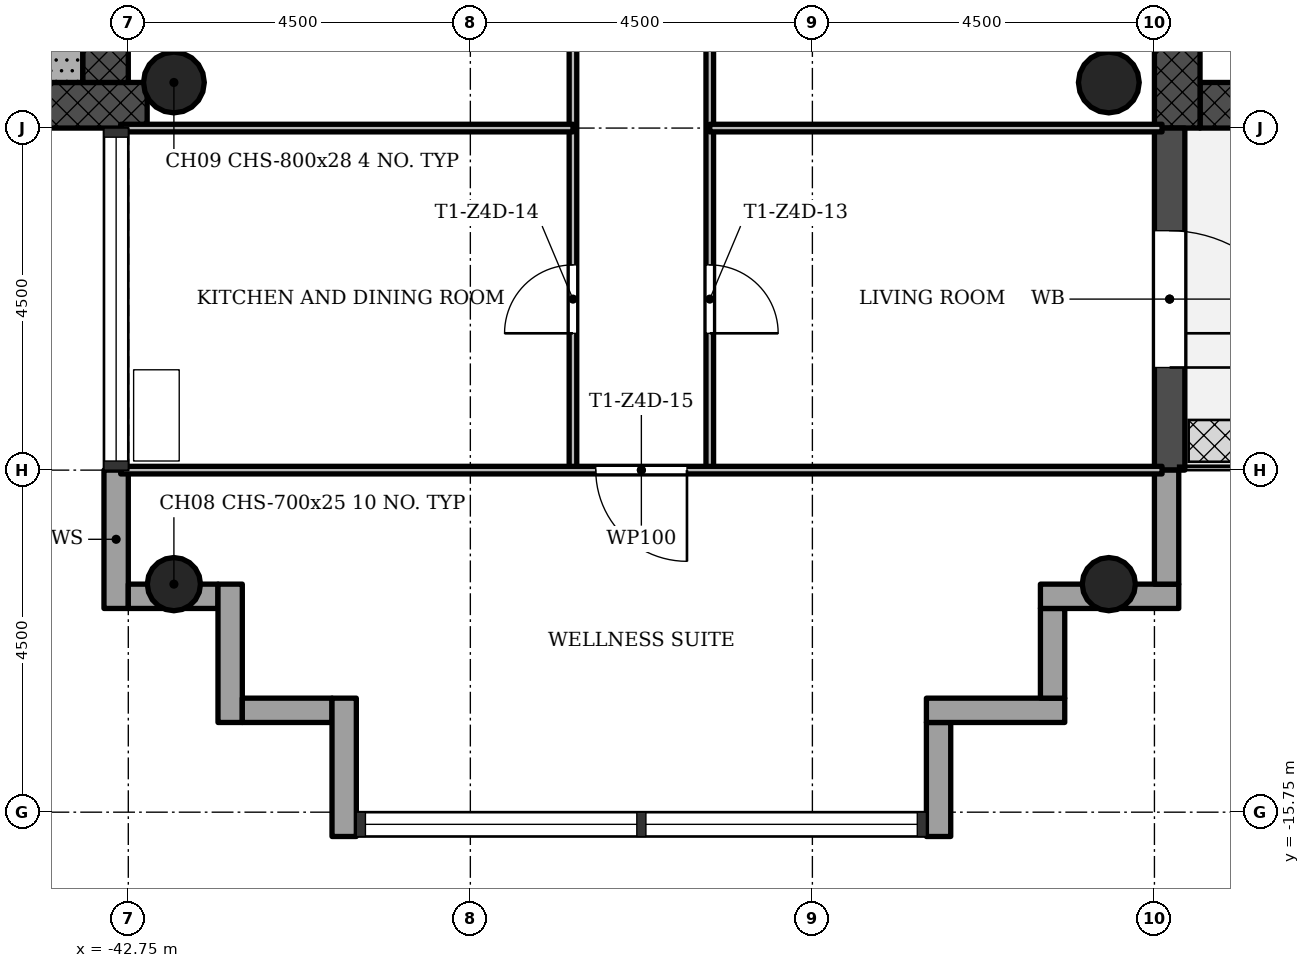
"""IFC4 building model, lengths in metres.
Left out: names, types, materials, properties, quantities, classifications, styles, units other than length and angle.
Written with IfcOpenShell. Run it as: python <this file> out.ifc"""

import sys

from ifc_helpers import new_model, si_unit, direction, frame, frame_2d, origin, origin_2d, place, context, subcontext, project, spatial, rectangle, hollow_circle, extrude, element, fill, save


model = new_model("IFC4")
c1 = context("Model", 3, precision=1e-05, world=origin(), true_north=direction((0.0, 1.0)))
c2 = subcontext(c1, "Body", "Model", "MODEL_VIEW")
j1 = project(units=[si_unit("LENGTHUNIT", "METRE"), si_unit("PLANEANGLEUNIT", "RADIAN")], contexts=[c1])
p1 = place(None, origin())
s1 = spatial("IfcSite", under=j1, at=p1, CompositionType="ELEMENT")
p2 = place(p1, origin())
s2 = spatial("IfcBuilding", under=s1, at=p2, CompositionType="ELEMENT")
p3 = place(p2, frame((0.0, 0.0, 199.4)))
s3 = spatial("IfcBuildingStorey", under=s2, at=p3, CompositionType="ELEMENT", Elevation=199.4)
p4 = place(p3, frame((-28.65, -6.45, 0.0), z_axis=(0.0, 0.0, 1.0), x_axis=(1.0, 0.0, 0.0)))
e1 = element("IfcWall", 1, at=p4, inside=s3, PredefinedType="SHEAR", context=c2, shape_type="SweptSolid", body=[
    extrude(rectangle(XDim=8.4, YDim=0.6, at=frame_2d((4.2, 0.0))), origin(), (0.0, 0.0, 1.0), 3.4),
])
p5 = place(p3, frame((-28.95, 6.15, 0.0), z_axis=(0.0, 0.0, 1.0), x_axis=(0.0, -1.0, 0.0)))
e2 = element("IfcWall", 2, at=p5, inside=s3, PredefinedType="SHEAR", context=c2, shape_type="SweptSolid", body=[
    extrude(rectangle(XDim=12.9, YDim=0.6, at=frame_2d((6.45, 0.0))), origin(), (0.0, 0.0, 1.0), 3.4),
])
p6 = place(p5, frame((5.25, 0.0, 0.0)))
e3 = element("IfcOpeningElement", 3, at=p6, cuts=e2, PredefinedType="OPENING", context=c2, shape_type="SweptSolid", body=[
    extrude(rectangle(XDim=1.8, YDim=2.1, at=frame_2d((0.9, 1.05))), frame((0.0, 0.31, 0.0), z_axis=(0.0, -1.0, 0.0), x_axis=(1.0, 0.0, 0.0)), (0.0, 0.0, 1.0), 0.62),
])
p7 = place(p3, frame((-51.15, -6.45, 0.0), z_axis=(0.0, 0.0, 1.0), x_axis=(1.0, 0.0, 0.0)))
e4 = element("IfcWall", 4, at=p7, inside=s3, PredefinedType="SHEAR", context=c2, shape_type="SweptSolid", body=[
    extrude(rectangle(XDim=8.648, YDim=0.6, at=frame_2d((4.324, 0.0))), origin(), (0.0, 0.0, 1.0), 3.4),
])
p8 = place(p3, frame((-43.05, -6.15, 0.0), z_axis=(0.0, 0.0, 1.0), x_axis=(0.0, 1.0, 0.0)))
e5 = element("IfcWall", 5, at=p8, inside=s3, PredefinedType="SHEAR", context=c2, shape_type="SweptSolid", body=[
    extrude(rectangle(XDim=12.9, YDim=0.6, at=frame_2d((6.45, 0.0))), origin(), (0.0, 0.0, 1.0), 3.4),
])
p9 = place(p8, frame((5.25, 0.0, 0.0)))
e6 = element("IfcOpeningElement", 6, at=p9, cuts=e5, PredefinedType="OPENING", context=c2, shape_type="SweptSolid", body=[
    extrude(rectangle(XDim=1.8, YDim=2.1, at=frame_2d((0.9, 1.05))), frame((0.0, 0.31, 0.0), z_axis=(0.0, -1.0, 0.0), x_axis=(1.0, 0.0, 0.0)), (0.0, 0.0, 1.0), 0.62),
])
for number, where, z_axis, x_axis in (
    (7, (-42.15, -12.75, 0.0), (0.0, 0.0, 1.0), (1.0, 0.0, 0.0)),
    (8, (-29.85, -12.75, 0.0), (0.0, 0.0, 1.0), (1.0, 0.0, 0.0)),
):
    element("IfcColumn", number, at=place(p3, frame(where, z_axis=z_axis, x_axis=x_axis)), inside=s3, PredefinedType="COLUMN", context=c2, shape_type="SweptSolid", body=[
        extrude(hollow_circle(Radius=0.35, WallThickness=0.025, at=origin_2d()), origin(), (0.0, 0.0, 1.0), 3.4),
    ])
for number, where, z_axis, x_axis in (
    (9, (-42.15, -6.15, 0.0), (0.0, 0.0, 1.0), (1.0, 0.0, 0.0)),
    (10, (-29.85, -6.15, 0.0), (0.0, 0.0, 1.0), (1.0, 0.0, 0.0)),
):
    element("IfcColumn", number, at=place(p3, frame(where, z_axis=z_axis, x_axis=x_axis)), inside=s3, PredefinedType="COLUMN", context=c2, shape_type="SweptSolid", body=[
        extrude(hollow_circle(Radius=0.4, WallThickness=0.028, at=origin_2d()), origin(), (0.0, 0.0, 1.0), 3.4),
    ])
p10 = place(p3, frame((-42.91, -11.25, -0.3), z_axis=(0.0, 0.0, 1.0), x_axis=(0.0, -1.0, 0.0)))
e11 = element("IfcWall", 11, at=p10, inside=s3, PredefinedType="STANDARD", context=c2, shape_type="SweptSolid", body=[
    extrude(rectangle(XDim=1.82, YDim=0.32, at=frame_2d((0.91, 0.0))), origin(), (0.0, 0.0, 1.0), 3.4),
])
p11 = place(p3, frame((-42.75, -12.91, -0.3), z_axis=(0.0, 0.0, 1.0), x_axis=(1.0, 0.0, 0.0)))
e12 = element("IfcWall", 12, at=p11, inside=s3, PredefinedType="STANDARD", context=c2, shape_type="SweptSolid", body=[
    extrude(rectangle(XDim=1.18, YDim=0.32, at=frame_2d((0.59, 0.0))), origin(), (0.0, 0.0, 1.0), 3.4),
])
p12 = place(p3, frame((-41.41, -12.75, -0.3), z_axis=(0.0, 0.0, 1.0), x_axis=(0.0, -1.0, 0.0)))
e13 = element("IfcWall", 13, at=p12, inside=s3, PredefinedType="STANDARD", context=c2, shape_type="SweptSolid", body=[
    extrude(rectangle(XDim=1.82, YDim=0.32, at=frame_2d((0.91, 0.0))), origin(), (0.0, 0.0, 1.0), 3.4),
])
p13 = place(p3, frame((-41.25, -14.41, -0.3), z_axis=(0.0, 0.0, 1.0), x_axis=(1.0, 0.0, 0.0)))
e14 = element("IfcWall", 14, at=p13, inside=s3, PredefinedType="STANDARD", context=c2, shape_type="SweptSolid", body=[
    extrude(rectangle(XDim=1.18, YDim=0.32, at=frame_2d((0.59, 0.0))), origin(), (0.0, 0.0, 1.0), 3.4),
])
p14 = place(p3, frame((-39.91, -14.25, -0.3), z_axis=(0.0, 0.0, 1.0), x_axis=(0.0, -1.0, 0.0)))
e15 = element("IfcWall", 15, at=p14, inside=s3, PredefinedType="STANDARD", context=c2, shape_type="SweptSolid", body=[
    extrude(rectangle(XDim=1.82, YDim=0.32, at=frame_2d((0.91, 0.0))), origin(), (0.0, 0.0, 1.0), 3.4),
])
p15 = place(p3, frame((-32.09, -16.07, -0.3), z_axis=(0.0, 0.0, 1.0), x_axis=(0.0, 1.0, 0.0)))
e16 = element("IfcWall", 16, at=p15, inside=s3, PredefinedType="STANDARD", context=c2, shape_type="SweptSolid", body=[
    extrude(rectangle(XDim=1.5, YDim=0.32, at=frame_2d((0.75, 0.0))), origin(), (0.0, 0.0, 1.0), 3.4),
])
p16 = place(p3, frame((-32.25, -14.41, -0.3), z_axis=(0.0, 0.0, 1.0), x_axis=(1.0, 0.0, 0.0)))
e17 = element("IfcWall", 17, at=p16, inside=s3, PredefinedType="STANDARD", context=c2, shape_type="SweptSolid", body=[
    extrude(rectangle(XDim=1.82, YDim=0.32, at=frame_2d((0.91, 0.0))), origin(), (0.0, 0.0, 1.0), 3.4),
])
p17 = place(p3, frame((-30.59, -14.25, -0.3), z_axis=(0.0, 0.0, 1.0), x_axis=(0.0, 1.0, 0.0)))
e18 = element("IfcWall", 18, at=p17, inside=s3, PredefinedType="STANDARD", context=c2, shape_type="SweptSolid", body=[
    extrude(rectangle(XDim=1.18, YDim=0.32, at=frame_2d((0.59, 0.0))), origin(), (0.0, 0.0, 1.0), 3.4),
])
p18 = place(p3, frame((-30.75, -12.91, -0.3), z_axis=(0.0, 0.0, 1.0), x_axis=(1.0, 0.0, 0.0)))
e19 = element("IfcWall", 19, at=p18, inside=s3, PredefinedType="STANDARD", context=c2, shape_type="SweptSolid", body=[
    extrude(rectangle(XDim=1.82, YDim=0.32, at=frame_2d((0.91, 0.0))), origin(), (0.0, 0.0, 1.0), 3.4),
])
p19 = place(p3, frame((-29.09, -12.75, -0.3), z_axis=(0.0, 0.0, 1.0), x_axis=(0.0, 1.0, 0.0)))
e20 = element("IfcWall", 20, at=p19, inside=s3, PredefinedType="STANDARD", context=c2, shape_type="SweptSolid", body=[
    extrude(rectangle(XDim=1.5, YDim=0.32, at=frame_2d((0.75, 0.0))), origin(), (0.0, 0.0, 1.0), 3.4),
])
p20 = place(p3, frame((-29.05, -11.25, -0.02), z_axis=(0.0, 0.0, 1.0), x_axis=(0.0, 1.0, 0.0)))
e21 = element("IfcWall", 21, at=p20, inside=s3, PredefinedType="STANDARD", context=c2, shape_type="SweptSolid", body=[
    extrude(rectangle(XDim=4.5, YDim=0.4, at=frame_2d((2.25, 0.0))), origin(), (0.0, 0.0, 1.0), 3.12),
])
p21 = place(p20, frame((1.35, 0.0, 0.02)))
e22 = element("IfcOpeningElement", 22, at=p21, cuts=e21, PredefinedType="OPENING", context=c2, shape_type="SweptSolid", body=[
    extrude(rectangle(XDim=1.8, YDim=2.1, at=frame_2d((0.9, 1.05))), frame((0.0, 0.21, 0.0), z_axis=(0.0, -1.0, 0.0), x_axis=(1.0, 0.0, 0.0)), (0.0, 0.0, 1.0), 0.42),
])
p22 = place(p3, frame((-36.9, -11.25, 0.0), z_axis=(0.0, 0.0, 1.0), x_axis=(0.0, 1.0, 0.0)))
e23 = element("IfcWall", 23, at=p22, inside=s3, PredefinedType="PARTITIONING", context=c2, shape_type="SweptSolid", body=[
    extrude(rectangle(XDim=6.75, YDim=0.1, at=frame_2d((3.375, 0.0))), origin(), (0.0, 0.0, 1.0), 3.0),
])
p23 = place(p22, frame((1.8, 0.0, 0.0)))
e24 = element("IfcOpeningElement", 24, at=p23, cuts=e23, PredefinedType="OPENING", context=c2, shape_type="SweptSolid", body=[
    extrude(rectangle(XDim=0.9, YDim=2.1, at=frame_2d((0.45, 1.05))), frame((0.0, 0.06, 0.0), z_axis=(0.0, -1.0, 0.0), x_axis=(1.0, 0.0, 0.0)), (0.0, 0.0, 1.0), 0.12),
])
p24 = place(p3, frame((-35.1, -11.25, 0.0), z_axis=(0.0, 0.0, 1.0), x_axis=(0.0, 1.0, 0.0)))
e25 = element("IfcWall", 25, at=p24, inside=s3, PredefinedType="PARTITIONING", context=c2, shape_type="SweptSolid", body=[
    extrude(rectangle(XDim=6.75, YDim=0.1, at=frame_2d((3.375, 0.0))), origin(), (0.0, 0.0, 1.0), 3.0),
])
p25 = place(p24, frame((1.8, 0.0, 0.0)))
e26 = element("IfcOpeningElement", 26, at=p25, cuts=e25, PredefinedType="OPENING", context=c2, shape_type="SweptSolid", body=[
    extrude(rectangle(XDim=0.9, YDim=2.1, at=frame_2d((0.45, 1.05))), frame((0.0, 0.06, 0.0), z_axis=(0.0, -1.0, 0.0), x_axis=(1.0, 0.0, 0.0)), (0.0, 0.0, 1.0), 0.12),
])
p26 = place(p3, frame((-42.85, -11.25, 0.0), z_axis=(0.0, 0.0, 1.0), x_axis=(1.0, 0.0, 0.0)))
e27 = element("IfcWall", 27, at=p26, inside=s3, PredefinedType="PARTITIONING", context=c2, shape_type="SweptSolid", body=[
    extrude(rectangle(XDim=13.7, YDim=0.1, at=frame_2d((6.85, 0.0))), origin(), (0.0, 0.0, 1.0), 3.0),
])
p27 = place(p26, frame((6.25, 0.0, 0.0)))
e28 = element("IfcOpeningElement", 28, at=p27, cuts=e27, PredefinedType="OPENING", context=c2, shape_type="SweptSolid", body=[
    extrude(rectangle(XDim=1.2, YDim=2.1, at=frame_2d((0.6, 1.05))), frame((0.0, 0.06, 0.0), z_axis=(0.0, -1.0, 0.0), x_axis=(1.0, 0.0, 0.0)), (0.0, 0.0, 1.0), 0.12),
])
for number, where, z_axis, x_axis in (
    (29, (-42.85, -6.75, 0.0), (0.0, 0.0, 1.0), (1.0, 0.0, 0.0)),
    (30, (-35.1, -6.75, 0.0), (0.0, 0.0, 1.0), (1.0, 0.0, 0.0)),
):
    element("IfcWall", number, at=place(p3, frame(where, z_axis=z_axis, x_axis=x_axis)), inside=s3, PredefinedType="PARTITIONING", context=c2, shape_type="SweptSolid", body=[
        extrude(rectangle(XDim=5.95, YDim=0.1, at=frame_2d((2.975, 0.0))), origin(), (0.0, 0.0, 1.0), 3.0),
    ])
p28 = place(p3, frame((-43.65, -1.85, 0.0), z_axis=(0.0, 0.0, 1.0), x_axis=(0.0, -1.0, 0.0)))
e31 = element("IfcWall", 31, at=p28, inside=s3, PredefinedType="SHEAR", context=c2, shape_type="SweptSolid", body=[
    extrude(rectangle(XDim=4.3, YDim=0.6, at=frame_2d((2.15, 0.0))), origin(), (0.0, 0.0, 1.0), 3.4),
])
p29 = place(p21, origin())
e32 = element("IfcDoor", 32, at=p29, inside=s3, OperationType="SINGLE_SWING_LEFT", PredefinedType="DOOR", context=c2, shape_type="SweptSolid", body=[
    extrude(rectangle(XDim=1.8, YDim=2.1, at=frame_2d((0.9, 1.05))), frame((0.0, 0.025, 0.0), z_axis=(0.0, -1.0, 0.0), x_axis=(1.0, 0.0, 0.0)), (0.0, 0.0, 1.0), 0.05),
])
fill(e22, e32)
p30 = place(p25, origin())
e33 = element("IfcDoor", 33, at=p30, inside=s3, OperationType="SINGLE_SWING_LEFT", PredefinedType="DOOR", context=c2, shape_type="SweptSolid", body=[
    extrude(rectangle(XDim=0.9, YDim=2.1, at=frame_2d((0.45, 1.05))), frame((0.0, 0.025, 0.0), z_axis=(0.0, -1.0, 0.0), x_axis=(1.0, 0.0, 0.0)), (0.0, 0.0, 1.0), 0.05),
])
fill(e26, e33)
p31 = place(p23, origin())
e34 = element("IfcDoor", 34, at=p31, inside=s3, OperationType="SINGLE_SWING_RIGHT", PredefinedType="DOOR", context=c2, shape_type="SweptSolid", body=[
    extrude(rectangle(XDim=0.9, YDim=2.1, at=frame_2d((0.45, 1.05))), frame((0.0, 0.025, 0.0), z_axis=(0.0, -1.0, 0.0), x_axis=(1.0, 0.0, 0.0)), (0.0, 0.0, 1.0), 0.05),
])
fill(e24, e34)
p32 = place(p27, origin())
e35 = element("IfcDoor", 35, at=p32, inside=s3, OperationType="SINGLE_SWING_RIGHT", PredefinedType="DOOR", context=c2, shape_type="SweptSolid", body=[
    extrude(rectangle(XDim=1.2, YDim=2.1, at=frame_2d((0.6, 1.05))), frame((0.0, 0.025, 0.0), z_axis=(0.0, -1.0, 0.0), x_axis=(1.0, 0.0, 0.0)), (0.0, 0.0, 1.0), 0.05),
])
fill(e28, e35)
save(model, sys.argv[1])
